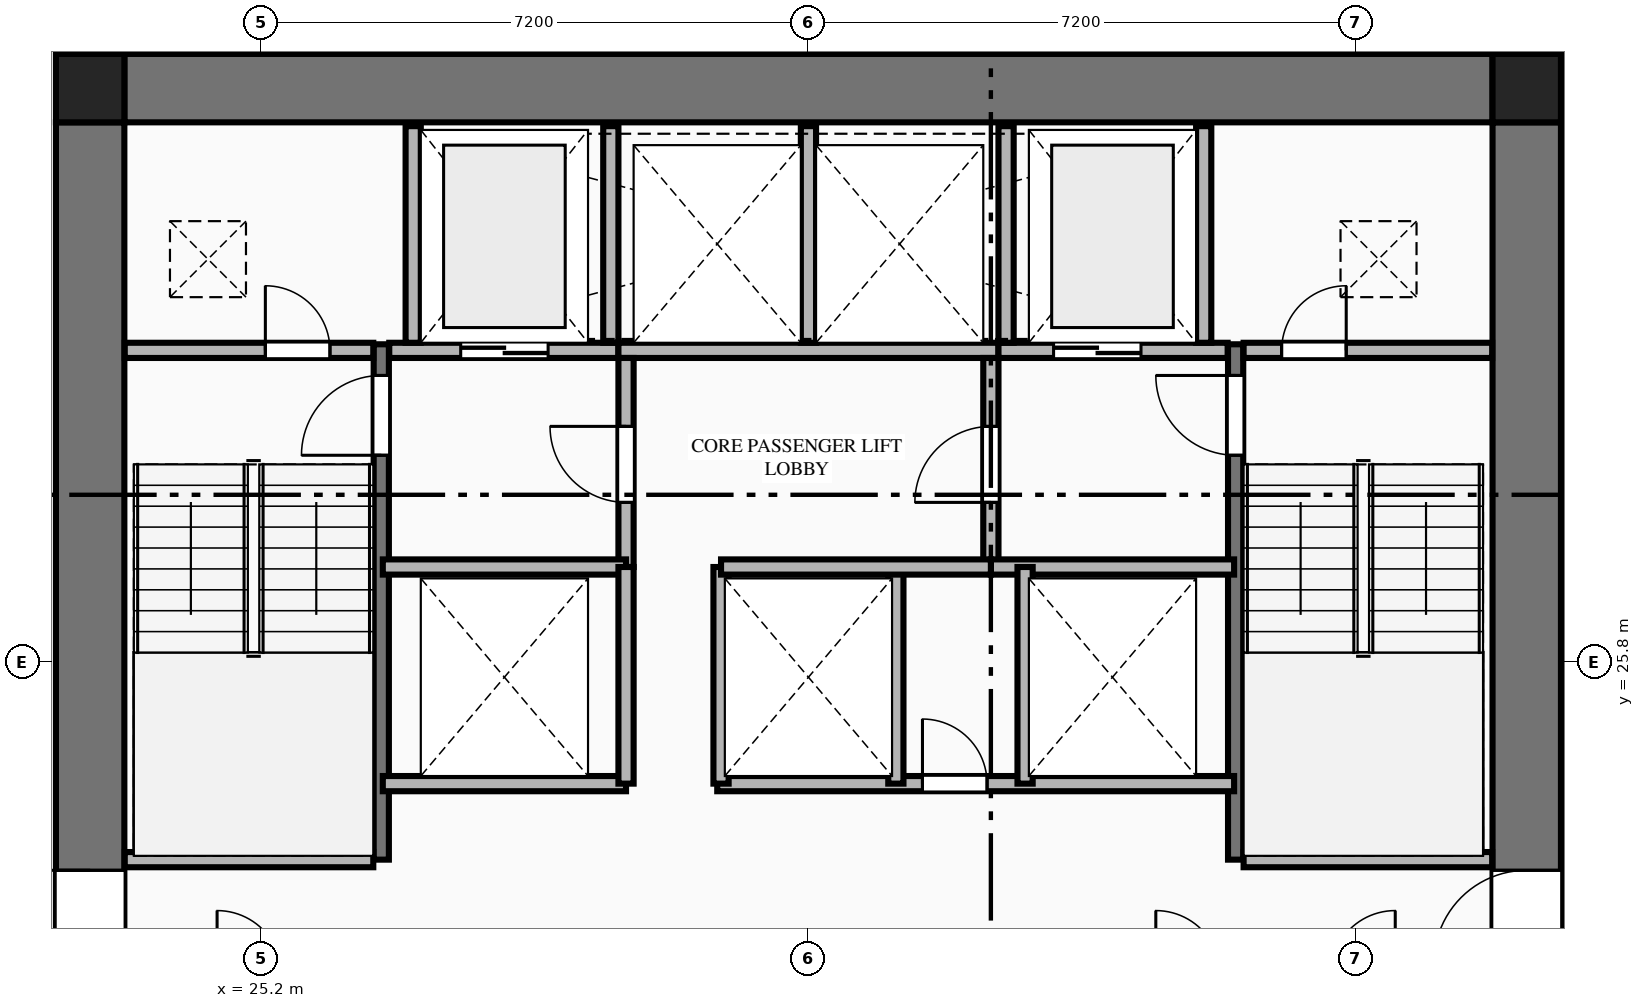
"""IFC4 building model, lengths in metres.
Left out: names, types, materials, properties, quantities, classifications, styles, units other than length and angle.
Written with IfcOpenShell. Run it as: python <this file> out.ifc"""

import sys

from ifc_helpers import new_model, si_unit, direction, frame, frame_2d, origin, origin_2d, place, context, subcontext, project, spatial, rectangle, extrude, element, fill, save


model = new_model("IFC4")
c1 = context("Model", 3, precision=1e-05, world=origin(), true_north=direction((0.0, 1.0)))
c2 = subcontext(c1, "Body", "Model", "MODEL_VIEW")
j1 = project(units=[si_unit("LENGTHUNIT", "METRE"), si_unit("PLANEANGLEUNIT", "RADIAN")], contexts=[c1])
p1 = place(None, origin())
s1 = spatial("IfcSite", under=j1, at=p1, CompositionType="ELEMENT")
p2 = place(p1, origin())
s2 = spatial("IfcBuilding", under=s1, at=p2, CompositionType="ELEMENT")
p3 = place(p2, frame((0.0, 0.0, 28.45)))
s3 = spatial("IfcBuildingStorey", under=s2, at=p3, CompositionType="ELEMENT", Elevation=28.45)
for number, where, z_axis, x_axis in (
    (1, (41.85, 33.35, 0.0), (0.0, 0.0, 1.0), (1.0, 0.0, 0.0)),
    (2, (22.95, 33.35, 0.0), (0.0, 0.0, 1.0), (1.0, 0.0, 0.0)),
):
    element("IfcColumn", number, at=place(p3, frame(where, z_axis=z_axis, x_axis=x_axis)), inside=s3, PredefinedType="COLUMN", context=c2, shape_type="SweptSolid", body=[
        extrude(rectangle(XDim=0.9, YDim=0.9, at=origin_2d()), origin(), (0.0, 0.0, 1.0), 3.55),
    ])
p4 = place(p3, frame((23.4, 33.35, 0.0), z_axis=(0.0, 0.0, 1.0), x_axis=(1.0, 0.0, 0.0)))
e3 = element("IfcWall", 3, at=p4, inside=s3, PredefinedType="SHEAR", context=c2, shape_type="SweptSolid", body=[
    extrude(rectangle(XDim=18.0, YDim=0.9, at=frame_2d((9.0, 0.0))), origin(), (0.0, 0.0, 1.0), 3.33),
])
p5 = place(p3, frame((22.95, 18.9, 0.0), z_axis=(0.0, 0.0, 1.0), x_axis=(0.0, 1.0, 0.0)))
e4 = element("IfcWall", 4, at=p5, inside=s3, PredefinedType="SHEAR", context=c2, shape_type="SweptSolid", body=[
    extrude(rectangle(XDim=14.0, YDim=0.9, at=frame_2d((7.0, 0.0))), origin(), (0.0, 0.0, 1.0), 3.33),
])
p6 = place(p5, frame((2.94, 0.0, 0.0)))
e5 = element("IfcOpeningElement", 5, at=p6, cuts=e4, PredefinedType="OPENING", context=c2, shape_type="SweptSolid", body=[
    extrude(rectangle(XDim=1.22, YDim=2.25, at=frame_2d((0.61, 1.125))), frame((0.0, 0.46, 0.0), z_axis=(0.0, -1.0, 0.0), x_axis=(1.0, 0.0, 0.0)), (0.0, 0.0, 1.0), 0.92),
])
p7 = place(p3, frame((41.85, 18.9, 0.0), z_axis=(0.0, 0.0, 1.0), x_axis=(0.0, 1.0, 0.0)))
e6 = element("IfcWall", 6, at=p7, inside=s3, PredefinedType="SHEAR", context=c2, shape_type="SweptSolid", body=[
    extrude(rectangle(XDim=14.0, YDim=0.9, at=frame_2d((7.0, 0.0))), origin(), (0.0, 0.0, 1.0), 3.33),
])
p8 = place(p7, frame((2.94, 0.0, 0.0)))
e7 = element("IfcOpeningElement", 7, at=p8, cuts=e6, PredefinedType="OPENING", context=c2, shape_type="SweptSolid", body=[
    extrude(rectangle(XDim=1.22, YDim=2.25, at=frame_2d((0.61, 1.125))), frame((0.0, 0.46, 0.0), z_axis=(0.0, -1.0, 0.0), x_axis=(1.0, 0.0, 0.0)), (0.0, 0.0, 1.0), 0.92),
])
p9 = place(p3, frame((26.78, 23.2, 0.0), z_axis=(0.0, 0.0, 1.0), x_axis=(0.0, 1.0, 0.0)))
e8 = element("IfcWall", 8, at=p9, inside=s3, PredefinedType="SHEAR", context=c2, shape_type="SweptSolid", body=[
    extrude(rectangle(XDim=6.78, YDim=0.2, at=frame_2d((3.39, 0.0))), origin(), (0.0, 0.0, 1.0), 3.55),
])
p10 = place(p9, frame((5.32, 0.0, 0.0)))
e9 = element("IfcOpeningElement", 9, at=p10, cuts=e8, PredefinedType="OPENING", context=c2, shape_type="SweptSolid", body=[
    extrude(rectangle(XDim=1.05, YDim=2.15, at=frame_2d((0.525, 1.075))), frame((0.0, 0.11, 0.0), z_axis=(0.0, -1.0, 0.0), x_axis=(1.0, 0.0, 0.0)), (0.0, 0.0, 1.0), 0.22),
])
p11 = place(p3, frame((23.405, 23.2, 0.0), z_axis=(0.0, 0.0, 1.0), x_axis=(1.0, 0.0, 0.0)))
e10 = element("IfcWall", 10, at=p11, inside=s3, PredefinedType="PLUMBINGWALL", context=c2, shape_type="SweptSolid", body=[
    extrude(rectangle(XDim=3.27, YDim=0.2, at=frame_2d((1.635, 0.0))), origin(), (0.0, 0.0, 1.0), 3.33),
])
p12 = place(p3, frame((38.02, 23.2, 0.0), z_axis=(0.0, 0.0, 1.0), x_axis=(0.0, 1.0, 0.0)))
e11 = element("IfcWall", 11, at=p12, inside=s3, PredefinedType="SHEAR", context=c2, shape_type="SweptSolid", body=[
    extrude(rectangle(XDim=6.78, YDim=0.2, at=frame_2d((3.39, 0.0))), origin(), (0.0, 0.0, 1.0), 3.55),
])
p13 = place(p12, frame((5.32, 0.0, 0.0)))
e12 = element("IfcOpeningElement", 12, at=p13, cuts=e11, PredefinedType="OPENING", context=c2, shape_type="SweptSolid", body=[
    extrude(rectangle(XDim=1.05, YDim=2.15, at=frame_2d((0.525, 1.075))), frame((0.0, 0.11, 0.0), z_axis=(0.0, -1.0, 0.0), x_axis=(1.0, 0.0, 0.0)), (0.0, 0.0, 1.0), 0.22),
])
p14 = place(p3, frame((38.125, 23.2, 0.0), z_axis=(0.0, 0.0, 1.0), x_axis=(1.0, 0.0, 0.0)))
e13 = element("IfcWall", 13, at=p14, inside=s3, PredefinedType="PLUMBINGWALL", context=c2, shape_type="SweptSolid", body=[
    extrude(rectangle(XDim=3.27, YDim=0.2, at=frame_2d((1.635, 0.0))), origin(), (0.0, 0.0, 1.0), 3.33),
])
p15 = place(p3, frame((23.405, 29.9, 0.0), z_axis=(0.0, 0.0, 1.0), x_axis=(1.0, 0.0, 0.0)))
e14 = element("IfcWall", 14, at=p15, inside=s3, PredefinedType="PLUMBINGWALL", context=c2, shape_type="SweptSolid", body=[
    extrude(rectangle(XDim=3.27, YDim=0.2, at=frame_2d((1.635, 0.0))), origin(), (0.0, 0.0, 1.0), 3.33),
])
p16 = place(p15, frame((1.85, 0.0, 0.0)))
e15 = element("IfcOpeningElement", 15, at=p16, cuts=e14, PredefinedType="OPENING", context=c2, shape_type="SweptSolid", body=[
    extrude(rectangle(XDim=0.85, YDim=2.05, at=frame_2d((0.425, 1.025))), frame((0.0, 0.11, 0.0), z_axis=(0.0, -1.0, 0.0), x_axis=(1.0, 0.0, 0.0)), (0.0, 0.0, 1.0), 0.22),
])
p17 = place(p3, frame((26.885, 29.9, 0.0), z_axis=(0.0, 0.0, 1.0), x_axis=(1.0, 0.0, 0.0)))
e16 = element("IfcWall", 16, at=p17, inside=s3, PredefinedType="PLUMBINGWALL", context=c2, shape_type="SweptSolid", body=[
    extrude(rectangle(XDim=3.015, YDim=0.2, at=frame_2d((1.507, 0.0))), origin(), (0.0, 0.0, 1.0), 3.33),
])
p18 = place(p17, frame((0.94, 0.0, 0.0)))
e17 = element("IfcOpeningElement", 17, at=p18, cuts=e16, PredefinedType="OPENING", context=c2, shape_type="SweptSolid", body=[
    extrude(rectangle(XDim=1.15, YDim=2.2, at=frame_2d((0.575, 1.1))), frame((0.0, 0.11, 0.0), z_axis=(0.0, -1.0, 0.0), x_axis=(1.0, 0.0, 0.0)), (0.0, 0.0, 1.0), 0.22),
])
p19 = place(p3, frame((29.9, 29.9, 0.0), z_axis=(0.0, 0.0, 1.0), x_axis=(1.0, 0.0, 0.0)))
e18 = element("IfcWall", 18, at=p19, inside=s3, PredefinedType="PLUMBINGWALL", context=c2, shape_type="SweptSolid", body=[
    extrude(rectangle(XDim=5.0, YDim=0.2, at=frame_2d((2.5, 0.0))), origin(), (0.0, 0.0, 1.0), 3.33),
])
p20 = place(p3, frame((34.9, 29.9, 0.0), z_axis=(0.0, 0.0, 1.0), x_axis=(1.0, 0.0, 0.0)))
e19 = element("IfcWall", 19, at=p20, inside=s3, PredefinedType="PLUMBINGWALL", context=c2, shape_type="SweptSolid", body=[
    extrude(rectangle(XDim=3.015, YDim=0.2, at=frame_2d((1.508, 0.0))), origin(), (0.0, 0.0, 1.0), 3.33),
])
p21 = place(p20, frame((0.725, 0.0, 0.0)))
e20 = element("IfcOpeningElement", 20, at=p21, cuts=e19, PredefinedType="OPENING", context=c2, shape_type="SweptSolid", body=[
    extrude(rectangle(XDim=1.15, YDim=2.2, at=frame_2d((0.575, 1.1))), frame((0.0, 0.11, 0.0), z_axis=(0.0, -1.0, 0.0), x_axis=(1.0, 0.0, 0.0)), (0.0, 0.0, 1.0), 0.22),
])
p22 = place(p3, frame((38.125, 29.9, 0.0), z_axis=(0.0, 0.0, 1.0), x_axis=(1.0, 0.0, 0.0)))
e21 = element("IfcWall", 21, at=p22, inside=s3, PredefinedType="PLUMBINGWALL", context=c2, shape_type="SweptSolid", body=[
    extrude(rectangle(XDim=3.27, YDim=0.2, at=frame_2d((1.635, 0.0))), origin(), (0.0, 0.0, 1.0), 3.33),
])
p23 = place(p22, frame((0.5, 0.0, 0.0)))
e22 = element("IfcOpeningElement", 22, at=p23, cuts=e21, PredefinedType="OPENING", context=c2, shape_type="SweptSolid", body=[
    extrude(rectangle(XDim=0.85, YDim=2.05, at=frame_2d((0.425, 1.025))), frame((0.0, 0.11, 0.0), z_axis=(0.0, -1.0, 0.0), x_axis=(1.0, 0.0, 0.0)), (0.0, 0.0, 1.0), 0.22),
])
for number, where, z_axis, x_axis in (
    (23, (27.2, 30.0, 0.0), (0.0, 0.0, 1.0), (0.0, 1.0, 0.0)),
    (24, (29.8, 30.0, 0.0), (0.0, 0.0, 1.0), (0.0, 1.0, 0.0)),
    (25, (32.4, 30.0, 0.0), (0.0, 0.0, 1.0), (0.0, 1.0, 0.0)),
    (26, (35.0, 30.0, 0.0), (0.0, 0.0, 1.0), (0.0, 1.0, 0.0)),
    (27, (37.6, 30.0, 0.0), (0.0, 0.0, 1.0), (0.0, 1.0, 0.0)),
):
    element("IfcWall", number, at=place(p3, frame(where, z_axis=z_axis, x_axis=x_axis)), inside=s3, PredefinedType="PLUMBINGWALL", context=c2, shape_type="SweptSolid", body=[
        extrude(rectangle(XDim=2.85, YDim=0.2, at=frame_2d((1.425, 0.0))), origin(), (0.0, 0.0, 1.0), 3.33),
    ])
p24 = place(p3, frame((30.0, 27.05, 0.0), z_axis=(0.0, 0.0, 1.0), x_axis=(0.0, 1.0, 0.0)))
e28 = element("IfcWall", 28, at=p24, inside=s3, PredefinedType="PLUMBINGWALL", context=c2, shape_type="SweptSolid", body=[
    extrude(rectangle(XDim=2.75, YDim=0.2, at=frame_2d((1.375, 0.0))), origin(), (0.0, 0.0, 1.0), 3.33),
])
p25 = place(p24, frame((0.85, 0.0, 0.0)))
e29 = element("IfcOpeningElement", 29, at=p25, cuts=e28, PredefinedType="OPENING", context=c2, shape_type="SweptSolid", body=[
    extrude(rectangle(XDim=1.0, YDim=2.15, at=frame_2d((0.5, 1.075))), frame((0.0, 0.11, 0.0), z_axis=(0.0, -1.0, 0.0), x_axis=(1.0, 0.0, 0.0)), (0.0, 0.0, 1.0), 0.22),
])
p26 = place(p3, frame((26.8, 27.05, 0.0), z_axis=(0.0, 0.0, 1.0), x_axis=(1.0, 0.0, 0.0)))
e30 = element("IfcWall", 30, at=p26, inside=s3, PredefinedType="PLUMBINGWALL", context=c2, shape_type="SweptSolid", body=[
    extrude(rectangle(XDim=3.2, YDim=0.2, at=frame_2d((1.6, 0.0))), origin(), (0.0, 0.0, 1.0), 3.33),
])
p27 = place(p3, frame((34.8, 27.05, 0.0), z_axis=(0.0, 0.0, 1.0), x_axis=(0.0, 1.0, 0.0)))
e31 = element("IfcWall", 31, at=p27, inside=s3, PredefinedType="PLUMBINGWALL", context=c2, shape_type="SweptSolid", body=[
    extrude(rectangle(XDim=2.75, YDim=0.2, at=frame_2d((1.375, 0.0))), origin(), (0.0, 0.0, 1.0), 3.33),
])
p28 = place(p27, frame((0.85, 0.0, 0.0)))
e32 = element("IfcOpeningElement", 32, at=p28, cuts=e31, PredefinedType="OPENING", context=c2, shape_type="SweptSolid", body=[
    extrude(rectangle(XDim=1.0, YDim=2.15, at=frame_2d((0.5, 1.075))), frame((0.0, 0.11, 0.0), z_axis=(0.0, -1.0, 0.0), x_axis=(1.0, 0.0, 0.0)), (0.0, 0.0, 1.0), 0.22),
])
for number, where, z_axis, x_axis in (
    (33, (34.8, 27.05, 0.0), (0.0, 0.0, 1.0), (1.0, 0.0, 0.0)),
    (34, (26.8, 24.2, 0.0), (0.0, 0.0, 1.0), (1.0, 0.0, 0.0)),
):
    element("IfcWall", number, at=place(p3, frame(where, z_axis=z_axis, x_axis=x_axis)), inside=s3, PredefinedType="PLUMBINGWALL", context=c2, shape_type="SweptSolid", body=[
        extrude(rectangle(XDim=3.2, YDim=0.2, at=frame_2d((1.6, 0.0))), origin(), (0.0, 0.0, 1.0), 3.33),
    ])
p29 = place(p3, frame((30.0, 24.2, 0.0), z_axis=(0.0, 0.0, 1.0), x_axis=(0.0, 1.0, 0.0)))
e35 = element("IfcWall", 35, at=p29, inside=s3, PredefinedType="PLUMBINGWALL", context=c2, shape_type="SweptSolid", body=[
    extrude(rectangle(XDim=2.85, YDim=0.2, at=frame_2d((1.425, 0.0))), origin(), (0.0, 0.0, 1.0), 3.33),
])
p30 = place(p3, frame((31.2, 24.2, 0.0), z_axis=(0.0, 0.0, 1.0), x_axis=(1.0, 0.0, 0.0)))
e36 = element("IfcWall", 36, at=p30, inside=s3, PredefinedType="PLUMBINGWALL", context=c2, shape_type="SweptSolid", body=[
    extrude(rectangle(XDim=6.8, YDim=0.2, at=frame_2d((3.4, 0.0))), origin(), (0.0, 0.0, 1.0), 3.33),
])
p31 = place(p30, frame((2.7, 0.0, 0.0)))
e37 = element("IfcOpeningElement", 37, at=p31, cuts=e36, PredefinedType="OPENING", context=c2, shape_type="SweptSolid", body=[
    extrude(rectangle(XDim=0.85, YDim=2.05, at=frame_2d((0.425, 1.025))), frame((0.0, 0.11, 0.0), z_axis=(0.0, -1.0, 0.0), x_axis=(1.0, 0.0, 0.0)), (0.0, 0.0, 1.0), 0.22),
])
for number, where, z_axis, x_axis in (
    (38, (31.25, 24.2, 0.0), (0.0, 0.0, 1.0), (0.0, 1.0, 0.0)),
    (39, (33.55, 24.2, 0.0), (0.0, 0.0, 1.0), (0.0, 1.0, 0.0)),
    (40, (35.25, 24.2, 0.0), (0.0, 0.0, 1.0), (0.0, 1.0, 0.0)),
):
    element("IfcWall", number, at=place(p3, frame(where, z_axis=z_axis, x_axis=x_axis)), inside=s3, PredefinedType="PLUMBINGWALL", context=c2, shape_type="SweptSolid", body=[
        extrude(rectangle(XDim=2.85, YDim=0.2, at=frame_2d((1.425, 0.0))), origin(), (0.0, 0.0, 1.0), 3.33),
    ])
p32 = place(p3, frame((31.25, 27.05, 0.0), z_axis=(0.0, 0.0, 1.0), x_axis=(1.0, 0.0, 0.0)))
e41 = element("IfcWall", 41, at=p32, inside=s3, PredefinedType="PLUMBINGWALL", context=c2, shape_type="SweptSolid", body=[
    extrude(rectangle(XDim=3.55, YDim=0.2, at=frame_2d((1.775, 0.0))), origin(), (0.0, 0.0, 1.0), 3.33),
])
p33 = place(p6, origin())
e42 = element("IfcDoor", 42, at=p33, inside=s3, OperationType="SINGLE_SWING_RIGHT", PredefinedType="DOOR", context=c2, shape_type="SweptSolid", body=[
    extrude(rectangle(XDim=1.22, YDim=2.25, at=frame_2d((0.61, 1.125))), frame((0.0, 0.025, 0.0), z_axis=(0.0, -1.0, 0.0), x_axis=(1.0, 0.0, 0.0)), (0.0, 0.0, 1.0), 0.05),
])
fill(e5, e42)
p34 = place(p8, origin())
e43 = element("IfcDoor", 43, at=p34, inside=s3, OperationType="SINGLE_SWING_LEFT", PredefinedType="DOOR", context=c2, shape_type="SweptSolid", body=[
    extrude(rectangle(XDim=1.22, YDim=2.25, at=frame_2d((0.61, 1.125))), frame((0.0, 0.025, 0.0), z_axis=(0.0, -1.0, 0.0), x_axis=(1.0, 0.0, 0.0)), (0.0, 0.0, 1.0), 0.05),
])
fill(e7, e43)
p35 = place(p10, origin())
e44 = element("IfcDoor", 44, at=p35, inside=s3, OperationType="SINGLE_SWING_LEFT", PredefinedType="DOOR", context=c2, shape_type="SweptSolid", body=[
    extrude(rectangle(XDim=1.05, YDim=2.15, at=frame_2d((0.525, 1.075))), frame((0.0, 0.025, 0.0), z_axis=(0.0, -1.0, 0.0), x_axis=(1.0, 0.0, 0.0)), (0.0, 0.0, 1.0), 0.05),
])
fill(e9, e44)
p36 = place(p13, origin())
e45 = element("IfcDoor", 45, at=p36, inside=s3, OperationType="SINGLE_SWING_RIGHT", PredefinedType="DOOR", context=c2, shape_type="SweptSolid", body=[
    extrude(rectangle(XDim=1.05, YDim=2.15, at=frame_2d((0.525, 1.075))), frame((0.0, 0.025, 0.0), z_axis=(0.0, -1.0, 0.0), x_axis=(1.0, 0.0, 0.0)), (0.0, 0.0, 1.0), 0.05),
])
fill(e12, e45)
p37 = place(p16, origin())
e46 = element("IfcDoor", 46, at=p37, inside=s3, OperationType="SINGLE_SWING_LEFT", PredefinedType="DOOR", context=c2, shape_type="SweptSolid", body=[
    extrude(rectangle(XDim=0.85, YDim=2.05, at=frame_2d((0.425, 1.025))), frame((0.0, 0.025, 0.0), z_axis=(0.0, -1.0, 0.0), x_axis=(1.0, 0.0, 0.0)), (0.0, 0.0, 1.0), 0.05),
])
fill(e15, e46)
p38 = place(p23, origin())
e47 = element("IfcDoor", 47, at=p38, inside=s3, OperationType="SINGLE_SWING_RIGHT", PredefinedType="DOOR", context=c2, shape_type="SweptSolid", body=[
    extrude(rectangle(XDim=0.85, YDim=2.05, at=frame_2d((0.425, 1.025))), frame((0.0, 0.025, 0.0), z_axis=(0.0, -1.0, 0.0), x_axis=(1.0, 0.0, 0.0)), (0.0, 0.0, 1.0), 0.05),
])
fill(e22, e47)
p39 = place(p18, origin())
e48 = element("IfcDoor", 48, at=p39, inside=s3, OperationType="DOUBLE_DOOR_SLIDING", PredefinedType="DOOR", context=c2, shape_type="SweptSolid", body=[
    extrude(rectangle(XDim=1.15, YDim=2.2, at=frame_2d((0.575, 1.1))), frame((0.0, 0.025, 0.0), z_axis=(0.0, -1.0, 0.0), x_axis=(1.0, 0.0, 0.0)), (0.0, 0.0, 1.0), 0.05),
])
fill(e17, e48)
p40 = place(p21, origin())
e49 = element("IfcDoor", 49, at=p40, inside=s3, OperationType="DOUBLE_DOOR_SLIDING", PredefinedType="DOOR", context=c2, shape_type="SweptSolid", body=[
    extrude(rectangle(XDim=1.15, YDim=2.2, at=frame_2d((0.575, 1.1))), frame((0.0, 0.025, 0.0), z_axis=(0.0, -1.0, 0.0), x_axis=(1.0, 0.0, 0.0)), (0.0, 0.0, 1.0), 0.05),
])
fill(e20, e49)
p41 = place(p25, origin())
e50 = element("IfcDoor", 50, at=p41, inside=s3, OperationType="SINGLE_SWING_RIGHT", PredefinedType="DOOR", context=c2, shape_type="SweptSolid", body=[
    extrude(rectangle(XDim=1.0, YDim=2.15, at=frame_2d((0.5, 1.075))), frame((0.0, 0.025, 0.0), z_axis=(0.0, -1.0, 0.0), x_axis=(1.0, 0.0, 0.0)), (0.0, 0.0, 1.0), 0.05),
])
fill(e29, e50)
p42 = place(p28, origin())
e51 = element("IfcDoor", 51, at=p42, inside=s3, OperationType="SINGLE_SWING_LEFT", PredefinedType="DOOR", context=c2, shape_type="SweptSolid", body=[
    extrude(rectangle(XDim=1.0, YDim=2.15, at=frame_2d((0.5, 1.075))), frame((0.0, 0.025, 0.0), z_axis=(0.0, -1.0, 0.0), x_axis=(1.0, 0.0, 0.0)), (0.0, 0.0, 1.0), 0.05),
])
fill(e32, e51)
p43 = place(p31, origin())
e52 = element("IfcDoor", 52, at=p43, inside=s3, OperationType="SINGLE_SWING_LEFT", PredefinedType="DOOR", context=c2, shape_type="SweptSolid", body=[
    extrude(rectangle(XDim=0.85, YDim=2.05, at=frame_2d((0.425, 1.025))), frame((0.0, 0.025, 0.0), z_axis=(0.0, -1.0, 0.0), x_axis=(1.0, 0.0, 0.0)), (0.0, 0.0, 1.0), 0.05),
])
fill(e37, e52)
save(model, sys.argv[1])
